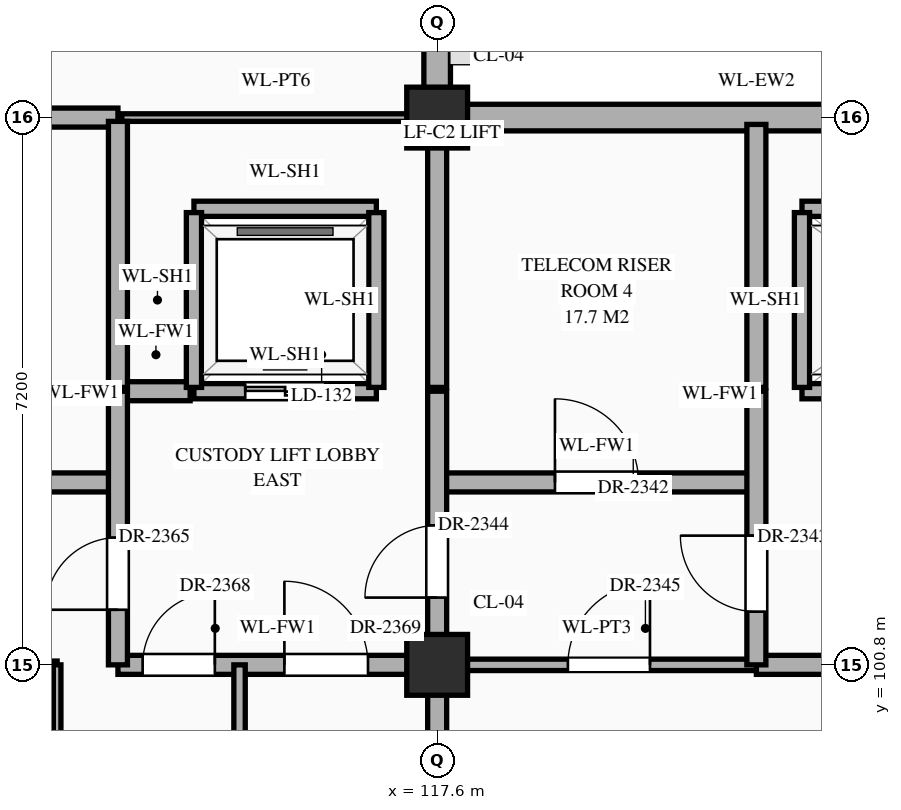
"""IFC4 building model, lengths in metres.
Left out: names, types, materials, properties, quantities, classifications, styles, units other than length and angle.
Written with IfcOpenShell. Run it as: python <this file> out.ifc"""

import sys

from ifc_helpers import new_model, si_unit, direction, frame, frame_2d, origin, origin_2d, place, context, subcontext, project, spatial, rectangle, extrude, element, fill, save


model = new_model("IFC4")
c1 = context("Model", 3, precision=1e-05, world=origin(), true_north=direction((0.0, 1.0)))
c2 = subcontext(c1, "Body", "Model", "MODEL_VIEW")
j1 = project(units=[si_unit("LENGTHUNIT", "METRE"), si_unit("PLANEANGLEUNIT", "RADIAN")], contexts=[c1])
p1 = place(None, origin())
s1 = spatial("IfcSite", under=j1, at=p1, CompositionType="ELEMENT")
p2 = place(p1, origin())
s2 = spatial("IfcBuilding", under=s1, at=p2, CompositionType="ELEMENT")
p3 = place(p2, frame((0.0, 0.0, 30.6)))
s3 = spatial("IfcBuildingStorey", under=s2, at=p3, CompositionType="ELEMENT", Elevation=30.6)
for number, where, z_axis, x_axis in (
    (1, (117.6, 100.8, 0.0), (0.0, 0.0, 1.0), (1.0, 0.0, 0.0)),
    (2, (117.6, 108.0, 0.0), (0.0, 0.0, 1.0), (1.0, 0.0, 0.0)),
):
    element("IfcColumn", number, at=place(p3, frame(where, z_axis=z_axis, x_axis=x_axis)), inside=s3, PredefinedType="COLUMN", context=c2, shape_type="SweptSolid", body=[
        extrude(rectangle(XDim=0.8, YDim=0.8, at=origin_2d()), origin(), (0.0, 0.0, 1.0), 4.5),
    ])
p4 = place(p3, frame((117.6, 108.395, 0.0), z_axis=(0.0, 0.0, 1.0), x_axis=(0.0, 1.0, 0.0)))
e3 = element("IfcWall", 3, at=p4, inside=s3, PredefinedType="STANDARD", context=c2, shape_type="SweptSolid", body=[
    extrude(rectangle(XDim=6.41, YDim=0.35, at=frame_2d((3.205, 0.0))), origin(), (0.0, 0.0, 1.0), 3.59),
])
p5 = place(p4, frame((4.055, 0.0, 0.85)))
e4 = element("IfcOpeningElement", 4, at=p5, cuts=e3, PredefinedType="OPENING", context=c2, shape_type="SweptSolid", body=[
    extrude(rectangle(XDim=0.9, YDim=1.92, at=frame_2d((0.45, 0.96))), frame((0.0, 0.187, 0.0), z_axis=(0.0, -1.0, 0.0), x_axis=(1.0, 0.0, 0.0)), (0.0, 0.0, 1.0), 0.374),
])
p6 = place(p3, frame((117.995, 108.0, 0.0), z_axis=(0.0, 0.0, 1.0), x_axis=(1.0, 0.0, 0.0)))
e5 = element("IfcWall", 5, at=p6, inside=s3, PredefinedType="STANDARD", context=c2, shape_type="SweptSolid", body=[
    extrude(rectangle(XDim=7.61, YDim=0.35, at=frame_2d((3.805, 0.0))), origin(), (0.0, 0.0, 1.0), 3.59),
])
p7 = place(p3, frame((109.2, 100.8, 0.0), z_axis=(0.0, 0.0, 1.0), x_axis=(1.0, 0.0, 0.0)))
e6 = element("IfcWall", 6, at=p7, inside=s3, PredefinedType="STANDARD", context=c2, shape_type="SweptSolid", body=[
    extrude(rectangle(XDim=3.4, YDim=0.1, at=frame_2d((1.7, 0.0))), origin(), (0.0, 0.0, 1.0), 3.39),
])
p8 = place(p7, frame((1.24, 0.0, 0.0)))
e7 = element("IfcOpeningElement", 7, at=p8, cuts=e6, PredefinedType="OPENING", context=c2, shape_type="SweptSolid", body=[
    extrude(rectangle(XDim=1.24, YDim=2.3, at=frame_2d((0.62, 1.15))), frame((0.0, 0.062, 0.0), z_axis=(0.0, -1.0, 0.0), x_axis=(1.0, 0.0, 0.0)), (0.0, 0.0, 1.0), 0.124),
])
p9 = place(p3, frame((113.4, 100.8, 0.0), z_axis=(0.0, 0.0, 1.0), x_axis=(1.0, 0.0, 0.0)))
e8 = element("IfcWall", 8, at=p9, inside=s3, PredefinedType="STANDARD", context=c2, shape_type="SweptSolid", body=[
    extrude(rectangle(XDim=4.2, YDim=0.25, at=frame_2d((2.1, 0.0))), origin(), (0.0, 0.0, 1.0), 3.39),
])
p10 = place(p9, frame((0.325, 0.0, 0.0)))
e9 = element("IfcOpeningElement", 9, at=p10, cuts=e8, PredefinedType="OPENING", context=c2, shape_type="SweptSolid", body=[
    extrude(rectangle(XDim=0.95, YDim=2.15, at=frame_2d((0.475, 1.075))), frame((0.0, 0.137, 0.0), z_axis=(0.0, -1.0, 0.0), x_axis=(1.0, 0.0, 0.0)), (0.0, 0.0, 1.0), 0.274),
])
p11 = place(p9, frame((2.19, 0.0, 0.0)))
e10 = element("IfcOpeningElement", 10, at=p11, cuts=e8, PredefinedType="OPENING", context=c2, shape_type="SweptSolid", body=[
    extrude(rectangle(XDim=1.1, YDim=2.2, at=frame_2d((0.55, 1.1))), frame((0.0, 0.137, 0.0), z_axis=(0.0, -1.0, 0.0), x_axis=(1.0, 0.0, 0.0)), (0.0, 0.0, 1.0), 0.274),
])
p12 = place(p3, frame((117.6, 100.8, 0.0), z_axis=(0.0, 0.0, 1.0), x_axis=(1.0, 0.0, 0.0)))
e11 = element("IfcWall", 11, at=p12, inside=s3, PredefinedType="STANDARD", context=c2, shape_type="SweptSolid", body=[
    extrude(rectangle(XDim=4.2, YDim=0.15, at=frame_2d((2.1, 0.0))), origin(), (0.0, 0.0, 1.0), 3.39),
])
p13 = place(p12, frame((1.72, 0.0, 0.0)))
e12 = element("IfcOpeningElement", 12, at=p13, cuts=e11, PredefinedType="OPENING", context=c2, shape_type="SweptSolid", body=[
    extrude(rectangle(XDim=1.08, YDim=2.25, at=frame_2d((0.54, 1.125))), frame((0.0, 0.087, 0.0), z_axis=(0.0, -1.0, 0.0), x_axis=(1.0, 0.0, 0.0)), (0.0, 0.0, 1.0), 0.174),
])
p14 = place(p3, frame((121.8, 100.8, 0.0), z_axis=(0.0, 0.0, 1.0), x_axis=(1.0, 0.0, 0.0)))
e13 = element("IfcWall", 13, at=p14, inside=s3, PredefinedType="STANDARD", context=c2, shape_type="SweptSolid", body=[
    extrude(rectangle(XDim=4.2, YDim=0.25, at=frame_2d((2.1, 0.0))), origin(), (0.0, 0.0, 1.0), 3.39),
])
p15 = place(p3, frame((109.2, 103.2, 0.0), z_axis=(0.0, 0.0, 1.0), x_axis=(1.0, 0.0, 0.0)))
e14 = element("IfcWall", 14, at=p15, inside=s3, PredefinedType="STANDARD", context=c2, shape_type="SweptSolid", body=[
    extrude(rectangle(XDim=4.2, YDim=0.25, at=frame_2d((2.1, 0.0))), origin(), (0.0, 0.0, 1.0), 4.24),
])
p16 = place(p15, frame((1.6, 0.0, 0.0)))
e15 = element("IfcOpeningElement", 15, at=p16, cuts=e14, PredefinedType="OPENING", context=c2, shape_type="SweptSolid", body=[
    extrude(rectangle(XDim=1.0, YDim=2.2, at=frame_2d((0.5, 1.1))), frame((0.0, 0.137, 0.0), z_axis=(0.0, -1.0, 0.0), x_axis=(1.0, 0.0, 0.0)), (0.0, 0.0, 1.0), 0.274),
])
p17 = place(p3, frame((117.6, 103.2, 0.0), z_axis=(0.0, 0.0, 1.0), x_axis=(1.0, 0.0, 0.0)))
e16 = element("IfcWall", 16, at=p17, inside=s3, PredefinedType="STANDARD", context=c2, shape_type="SweptSolid", body=[
    extrude(rectangle(XDim=4.2, YDim=0.25, at=frame_2d((2.1, 0.0))), origin(), (0.0, 0.0, 1.0), 4.24),
])
p18 = place(p17, frame((1.55, 0.0, 0.0)))
e17 = element("IfcOpeningElement", 17, at=p18, cuts=e16, PredefinedType="OPENING", context=c2, shape_type="SweptSolid", body=[
    extrude(rectangle(XDim=1.1, YDim=2.2, at=frame_2d((0.55, 1.1))), frame((0.0, 0.137, 0.0), z_axis=(0.0, -1.0, 0.0), x_axis=(1.0, 0.0, 0.0)), (0.0, 0.0, 1.0), 0.274),
])
p19 = place(p3, frame((113.45, 104.4, 0.0), z_axis=(0.0, 0.0, 1.0), x_axis=(1.0, 0.0, 0.0)))
e18 = element("IfcWall", 18, at=p19, inside=s3, PredefinedType="STANDARD", context=c2, shape_type="SweptSolid", body=[
    extrude(rectangle(XDim=0.9, YDim=0.25, at=frame_2d((0.45, 0.0))), origin(), (0.0, 0.0, 1.0), 4.24),
])
p20 = place(p3, frame((114.4, 104.4, 0.0), z_axis=(0.0, 0.0, 1.0), x_axis=(1.0, 0.0, 0.0)))
e19 = element("IfcWall", 19, at=p20, inside=s3, PredefinedType="STANDARD", context=c2, shape_type="SweptSolid", body=[
    extrude(rectangle(XDim=2.4, YDim=0.2, at=frame_2d((1.2, 0.0))), origin(), (0.0, 0.0, 1.0), 4.24),
])
p21 = place(p20, frame((0.675, 0.0, 0.0)))
e20 = element("IfcOpeningElement", 20, at=p21, cuts=e19, PredefinedType="OPENING", context=c2, shape_type="SweptSolid", body=[
    extrude(rectangle(XDim=1.05, YDim=2.15, at=frame_2d((0.525, 1.075))), frame((0.0, 0.112, 0.0), z_axis=(0.0, -1.0, 0.0), x_axis=(1.0, 0.0, 0.0)), (0.0, 0.0, 1.0), 0.224),
])
p22 = place(p3, frame((122.4, 104.4, 0.0), z_axis=(0.0, 0.0, 1.0), x_axis=(1.0, 0.0, 0.0)))
e21 = element("IfcWall", 21, at=p22, inside=s3, PredefinedType="STANDARD", context=c2, shape_type="SweptSolid", body=[
    extrude(rectangle(XDim=3.0, YDim=0.2, at=frame_2d((1.5, 0.0))), origin(), (0.0, 0.0, 1.0), 4.24),
])
p23 = place(p22, frame((0.9, 0.0, 0.0)))
e22 = element("IfcOpeningElement", 22, at=p23, cuts=e21, PredefinedType="OPENING", context=c2, shape_type="SweptSolid", body=[
    extrude(rectangle(XDim=1.2, YDim=2.15, at=frame_2d((0.6, 1.075))), frame((0.0, 0.112, 0.0), z_axis=(0.0, -1.0, 0.0), x_axis=(1.0, 0.0, 0.0)), (0.0, 0.0, 1.0), 0.224),
])
p24 = place(p3, frame((114.4, 106.8, 0.0), z_axis=(0.0, 0.0, 1.0), x_axis=(1.0, 0.0, 0.0)))
e23 = element("IfcWall", 23, at=p24, inside=s3, PredefinedType="STANDARD", context=c2, shape_type="SweptSolid", body=[
    extrude(rectangle(XDim=2.4, YDim=0.2, at=frame_2d((1.2, 0.0))), origin(), (0.0, 0.0, 1.0), 4.24),
])
p25 = place(p3, frame((122.4, 106.8, 0.0), z_axis=(0.0, 0.0, 1.0), x_axis=(1.0, 0.0, 0.0)))
e24 = element("IfcWall", 24, at=p25, inside=s3, PredefinedType="STANDARD", context=c2, shape_type="SweptSolid", body=[
    extrude(rectangle(XDim=3.0, YDim=0.2, at=frame_2d((1.5, 0.0))), origin(), (0.0, 0.0, 1.0), 4.24),
])
p26 = place(p3, frame((109.2, 108.0, 0.0), z_axis=(0.0, 0.0, 1.0), x_axis=(1.0, 0.0, 0.0)))
e25 = element("IfcWall", 25, at=p26, inside=s3, PredefinedType="STANDARD", context=c2, shape_type="SweptSolid", body=[
    extrude(rectangle(XDim=4.2, YDim=0.25, at=frame_2d((2.1, 0.0))), origin(), (0.0, 0.0, 1.0), 3.39),
])
p27 = place(p26, frame((1.76, 0.0, 0.0)))
e26 = element("IfcOpeningElement", 26, at=p27, cuts=e25, PredefinedType="OPENING", context=c2, shape_type="SweptSolid", body=[
    extrude(rectangle(XDim=1.0, YDim=2.2, at=frame_2d((0.5, 1.1))), frame((0.0, 0.137, 0.0), z_axis=(0.0, -1.0, 0.0), x_axis=(1.0, 0.0, 0.0)), (0.0, 0.0, 1.0), 0.274),
])
p28 = place(p3, frame((113.45, 108.0, 0.0), z_axis=(0.0, 0.0, 1.0), x_axis=(1.0, 0.0, 0.0)))
e27 = element("IfcWall", 27, at=p28, inside=s3, PredefinedType="STANDARD", context=c2, shape_type="SweptSolid", body=[
    extrude(rectangle(XDim=4.06, YDim=0.1, at=frame_2d((2.03, 0.0))), origin(), (0.0, 0.0, 1.0), 3.39),
])
p29 = place(p3, frame((112.6, 96.0, 0.0), z_axis=(0.0, 0.0, 1.0), x_axis=(0.0, 1.0, 0.0)))
e28 = element("IfcWall", 28, at=p29, inside=s3, PredefinedType="STANDARD", context=c2, shape_type="SweptSolid", body=[
    extrude(rectangle(XDim=4.8, YDim=0.1, at=frame_2d((2.4, 0.0))), origin(), (0.0, 0.0, 1.0), 4.24),
])
p30 = place(p29, frame((1.91, 0.0, 0.0)))
e29 = element("IfcOpeningElement", 29, at=p30, cuts=e28, PredefinedType="OPENING", context=c2, shape_type="SweptSolid", body=[
    extrude(rectangle(XDim=0.98, YDim=2.35, at=frame_2d((0.49, 1.175))), frame((0.0, 0.062, 0.0), z_axis=(0.0, -1.0, 0.0), x_axis=(1.0, 0.0, 0.0)), (0.0, 0.0, 1.0), 0.124),
])
p31 = place(p3, frame((113.4, 100.8, 0.0), z_axis=(0.0, 0.0, 1.0), x_axis=(0.0, 1.0, 0.0)))
e30 = element("IfcWall", 30, at=p31, inside=s3, PredefinedType="STANDARD", context=c2, shape_type="SweptSolid", body=[
    extrude(rectangle(XDim=3.6, YDim=0.25, at=frame_2d((1.8, 0.0))), origin(), (0.0, 0.0, 1.0), 3.84),
])
p32 = place(p31, frame((0.725, 0.0, 0.0)))
e31 = element("IfcOpeningElement", 31, at=p32, cuts=e30, PredefinedType="OPENING", context=c2, shape_type="SweptSolid", body=[
    extrude(rectangle(XDim=0.95, YDim=2.15, at=frame_2d((0.475, 1.075))), frame((0.0, 0.137, 0.0), z_axis=(0.0, -1.0, 0.0), x_axis=(1.0, 0.0, 0.0)), (0.0, 0.0, 1.0), 0.274),
])
p33 = place(p3, frame((113.4, 104.45, 0.0), z_axis=(0.0, 0.0, 1.0), x_axis=(0.0, 1.0, 0.0)))
e32 = element("IfcWall", 32, at=p33, inside=s3, PredefinedType="STANDARD", context=c2, shape_type="SweptSolid", body=[
    extrude(rectangle(XDim=3.5, YDim=0.25, at=frame_2d((1.75, 0.0))), origin(), (0.0, 0.0, 1.0), 3.84),
])
p34 = place(p3, frame((114.4, 104.45, 0.0), z_axis=(0.0, 0.0, 1.0), x_axis=(0.0, 1.0, 0.0)))
e33 = element("IfcWall", 33, at=p34, inside=s3, PredefinedType="STANDARD", context=c2, shape_type="SweptSolid", body=[
    extrude(rectangle(XDim=2.3, YDim=0.2, at=frame_2d((1.15, 0.0))), origin(), (0.0, 0.0, 1.0), 4.24),
])
p35 = place(p3, frame((115.0, 96.0, 0.0), z_axis=(0.0, 0.0, 1.0), x_axis=(0.0, 1.0, 0.0)))
e34 = element("IfcWall", 34, at=p35, inside=s3, PredefinedType="STANDARD", context=c2, shape_type="SweptSolid", body=[
    extrude(rectangle(XDim=4.8, YDim=0.15, at=frame_2d((2.4, 0.0))), origin(), (0.0, 0.0, 1.0), 4.24),
])
p36 = place(p35, frame((1.89, 0.0, 0.0)))
e35 = element("IfcOpeningElement", 35, at=p36, cuts=e34, PredefinedType="OPENING", context=c2, shape_type="SweptSolid", body=[
    extrude(rectangle(XDim=1.02, YDim=2.4, at=frame_2d((0.51, 1.2))), frame((0.0, 0.087, 0.0), z_axis=(0.0, -1.0, 0.0), x_axis=(1.0, 0.0, 0.0)), (0.0, 0.0, 1.0), 0.174),
])
p37 = place(p3, frame((116.8, 104.45, 0.0), z_axis=(0.0, 0.0, 1.0), x_axis=(0.0, 1.0, 0.0)))
e36 = element("IfcWall", 36, at=p37, inside=s3, PredefinedType="STANDARD", context=c2, shape_type="SweptSolid", body=[
    extrude(rectangle(XDim=2.3, YDim=0.2, at=frame_2d((1.15, 0.0))), origin(), (0.0, 0.0, 1.0), 4.24),
])
p38 = place(p3, frame((117.6, 91.2, 0.0), z_axis=(0.0, 0.0, 1.0), x_axis=(0.0, 1.0, 0.0)))
e37 = element("IfcWall", 37, at=p38, inside=s3, PredefinedType="STANDARD", context=c2, shape_type="SweptSolid", body=[
    extrude(rectangle(XDim=13.2, YDim=0.25, at=frame_2d((6.6, 0.0))), origin(), (0.0, 0.0, 1.0), 3.49),
])
p39 = place(p38, frame((0.54, 0.0, 0.0)))
e38 = element("IfcOpeningElement", 38, at=p39, cuts=e37, PredefinedType="OPENING", context=c2, shape_type="SweptSolid", body=[
    extrude(rectangle(XDim=1.0, YDim=2.2, at=frame_2d((0.5, 1.1))), frame((0.0, 0.137, 0.0), z_axis=(0.0, -1.0, 0.0), x_axis=(1.0, 0.0, 0.0)), (0.0, 0.0, 1.0), 0.274),
])
p40 = place(p38, frame((10.485, 0.0, 0.0)))
e39 = element("IfcOpeningElement", 39, at=p40, cuts=e37, PredefinedType="OPENING", context=c2, shape_type="SweptSolid", body=[
    extrude(rectangle(XDim=0.95, YDim=2.15, at=frame_2d((0.475, 1.075))), frame((0.0, 0.137, 0.0), z_axis=(0.0, -1.0, 0.0), x_axis=(1.0, 0.0, 0.0)), (0.0, 0.0, 1.0), 0.274),
])
p41 = place(p38, frame((3.285, 0.0, 0.0)))
e40 = element("IfcOpeningElement", 40, at=p41, cuts=e37, PredefinedType="OPENING", context=c2, shape_type="SweptSolid", body=[
    extrude(rectangle(XDim=0.95, YDim=2.15, at=frame_2d((0.475, 1.075))), frame((0.0, 0.137, 0.0), z_axis=(0.0, -1.0, 0.0), x_axis=(1.0, 0.0, 0.0)), (0.0, 0.0, 1.0), 0.274),
])
p42 = place(p3, frame((117.6, 104.45, 0.0), z_axis=(0.0, 0.0, 1.0), x_axis=(0.0, 1.0, 0.0)))
e41 = element("IfcWall", 41, at=p42, inside=s3, PredefinedType="STANDARD", context=c2, shape_type="SweptSolid", body=[
    extrude(rectangle(XDim=3.46, YDim=0.25, at=frame_2d((1.73, 0.0))), origin(), (0.0, 0.0, 1.0), 3.49),
])
p43 = place(p3, frame((121.8, 100.8, 0.0), z_axis=(0.0, 0.0, 1.0), x_axis=(0.0, 1.0, 0.0)))
e42 = element("IfcWall", 42, at=p43, inside=s3, PredefinedType="STANDARD", context=c2, shape_type="SweptSolid", body=[
    extrude(rectangle(XDim=3.6, YDim=0.25, at=frame_2d((1.8, 0.0))), origin(), (0.0, 0.0, 1.0), 3.89),
])
p44 = place(p43, frame((0.7, 0.0, 0.0)))
e43 = element("IfcOpeningElement", 43, at=p44, cuts=e42, PredefinedType="OPENING", context=c2, shape_type="SweptSolid", body=[
    extrude(rectangle(XDim=1.0, YDim=2.2, at=frame_2d((0.5, 1.1))), frame((0.0, 0.137, 0.0), z_axis=(0.0, -1.0, 0.0), x_axis=(1.0, 0.0, 0.0)), (0.0, 0.0, 1.0), 0.274),
])
p45 = place(p3, frame((121.8, 104.45, 0.0), z_axis=(0.0, 0.0, 1.0), x_axis=(0.0, 1.0, 0.0)))
e44 = element("IfcWall", 44, at=p45, inside=s3, PredefinedType="STANDARD", context=c2, shape_type="SweptSolid", body=[
    extrude(rectangle(XDim=3.46, YDim=0.25, at=frame_2d((1.73, 0.0))), origin(), (0.0, 0.0, 1.0), 3.89),
])
p46 = place(p3, frame((122.4, 104.45, 0.0), z_axis=(0.0, 0.0, 1.0), x_axis=(0.0, 1.0, 0.0)))
e45 = element("IfcWall", 45, at=p46, inside=s3, PredefinedType="STANDARD", context=c2, shape_type="SweptSolid", body=[
    extrude(rectangle(XDim=2.3, YDim=0.2, at=frame_2d((1.15, 0.0))), origin(), (0.0, 0.0, 1.0), 4.24),
])
p47 = place(p21, origin())
e46 = element("IfcDoor", 46, at=p47, inside=s3, OperationType="DOUBLE_DOOR_SLIDING", PredefinedType="DOOR", context=c2, shape_type="SweptSolid", body=[
    extrude(rectangle(XDim=1.05, YDim=2.15, at=frame_2d((0.525, 1.075))), frame((0.0, 0.025, 0.0), z_axis=(0.0, -1.0, 0.0), x_axis=(1.0, 0.0, 0.0)), (0.0, 0.0, 1.0), 0.05),
])
fill(e20, e46)
p48 = place(p18, origin())
e47 = element("IfcDoor", 47, at=p48, inside=s3, OperationType="SINGLE_SWING_LEFT", PredefinedType="DOOR", context=c2, shape_type="SweptSolid", body=[
    extrude(rectangle(XDim=1.1, YDim=2.2, at=frame_2d((0.55, 1.1))), frame((0.0, 0.025, 0.0), z_axis=(0.0, -1.0, 0.0), x_axis=(1.0, 0.0, 0.0)), (0.0, 0.0, 1.0), 0.05),
])
fill(e17, e47)
p49 = place(p44, origin())
e48 = element("IfcDoor", 48, at=p49, inside=s3, OperationType="SINGLE_SWING_RIGHT", PredefinedType="DOOR", context=c2, shape_type="SweptSolid", body=[
    extrude(rectangle(XDim=1.0, YDim=2.2, at=frame_2d((0.5, 1.1))), frame((0.0, 0.025, 0.0), z_axis=(0.0, -1.0, 0.0), x_axis=(1.0, 0.0, 0.0)), (0.0, 0.0, 1.0), 0.05),
])
fill(e43, e48)
p50 = place(p40, origin())
e49 = element("IfcDoor", 49, at=p50, inside=s3, OperationType="SINGLE_SWING_LEFT", PredefinedType="DOOR", context=c2, shape_type="SweptSolid", body=[
    extrude(rectangle(XDim=0.95, YDim=2.15, at=frame_2d((0.475, 1.075))), frame((0.0, 0.025, 0.0), z_axis=(0.0, -1.0, 0.0), x_axis=(1.0, 0.0, 0.0)), (0.0, 0.0, 1.0), 0.05),
])
fill(e39, e49)
p51 = place(p13, origin())
e50 = element("IfcDoor", 50, at=p51, inside=s3, OperationType="SINGLE_SWING_RIGHT", PredefinedType="DOOR", context=c2, shape_type="SweptSolid", body=[
    extrude(rectangle(XDim=1.08, YDim=2.25, at=frame_2d((0.54, 1.125))), frame((0.0, 0.025, 0.0), z_axis=(0.0, -1.0, 0.0), x_axis=(1.0, 0.0, 0.0)), (0.0, 0.0, 1.0), 0.05),
])
fill(e12, e50)
p52 = place(p32, origin())
e51 = element("IfcDoor", 51, at=p52, inside=s3, OperationType="SINGLE_SWING_LEFT", PredefinedType="DOOR", context=c2, shape_type="SweptSolid", body=[
    extrude(rectangle(XDim=0.95, YDim=2.15, at=frame_2d((0.475, 1.075))), frame((0.0, 0.025, 0.0), z_axis=(0.0, -1.0, 0.0), x_axis=(1.0, 0.0, 0.0)), (0.0, 0.0, 1.0), 0.05),
])
fill(e31, e51)
p53 = place(p10, origin())
e52 = element("IfcDoor", 52, at=p53, inside=s3, OperationType="SINGLE_SWING_RIGHT", PredefinedType="DOOR", context=c2, shape_type="SweptSolid", body=[
    extrude(rectangle(XDim=0.95, YDim=2.15, at=frame_2d((0.475, 1.075))), frame((0.0, 0.025, 0.0), z_axis=(0.0, -1.0, 0.0), x_axis=(1.0, 0.0, 0.0)), (0.0, 0.0, 1.0), 0.05),
])
fill(e9, e52)
p54 = place(p11, origin())
e53 = element("IfcDoor", 53, at=p54, inside=s3, OperationType="SINGLE_SWING_LEFT", PredefinedType="DOOR", context=c2, shape_type="SweptSolid", body=[
    extrude(rectangle(XDim=1.1, YDim=2.2, at=frame_2d((0.55, 1.1))), frame((0.0, 0.025, 0.0), z_axis=(0.0, -1.0, 0.0), x_axis=(1.0, 0.0, 0.0)), (0.0, 0.0, 1.0), 0.05),
])
fill(e10, e53)
save(model, sys.argv[1])
